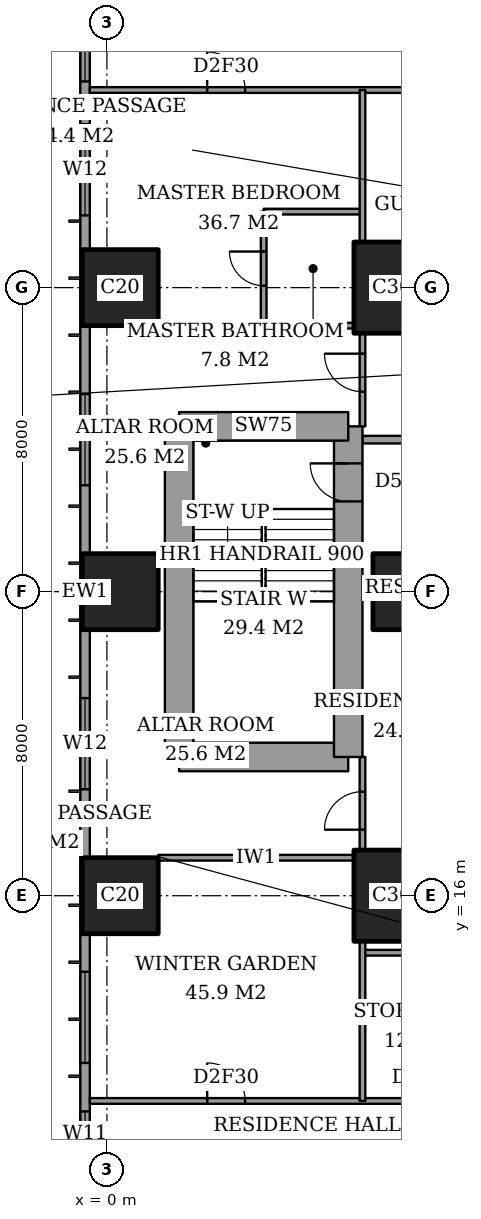
"""IFC4 building model, lengths in metres.
Left out: names, types, materials, properties, quantities, classifications, styles, units other than length and angle.
Written with IfcOpenShell. Run it as: python <this file> out.ifc"""

import sys

from ifc_helpers import new_model, si_unit, direction, frame, frame_2d, origin, origin_2d, place, context, subcontext, project, spatial, rectangle, extrude, element, fill, save


model = new_model("IFC4")
c1 = context("Model", 3, precision=1e-05, world=origin(), true_north=direction((0.0, 1.0)))
c2 = subcontext(c1, "Body", "Model", "MODEL_VIEW")
j1 = project(units=[si_unit("LENGTHUNIT", "METRE"), si_unit("PLANEANGLEUNIT", "RADIAN")], contexts=[c1])
p1 = place(None, origin())
s1 = spatial("IfcSite", under=j1, at=p1, CompositionType="ELEMENT")
p2 = place(p1, origin())
s2 = spatial("IfcBuilding", under=s1, at=p2, CompositionType="ELEMENT")
p3 = place(p2, frame((0.0, 0.0, 125.0)))
s3 = spatial("IfcBuildingStorey", under=s2, at=p3, CompositionType="ELEMENT", Elevation=125.0)
for number, where, z_axis, x_axis in (
    (1, (0.35, 16.0, 0.0), (0.0, 0.0, 1.0), (1.0, 0.0, 0.0)),
    (2, (0.35, 24.0, 0.0), (0.0, 0.0, 1.0), (1.0, 0.0, 0.0)),
    (3, (0.35, 32.0, 0.0), (0.0, 0.0, 1.0), (1.0, 0.0, 0.0)),
):
    element("IfcColumn", number, at=place(p3, frame(where, z_axis=z_axis, x_axis=x_axis)), inside=s3, PredefinedType="COLUMN", context=c2, shape_type="SweptSolid", body=[
        extrude(rectangle(XDim=2.0, YDim=2.0, at=origin_2d()), origin(), (0.0, 0.0, 1.0), 3.6),
    ])
p4 = place(p3, frame((8.0, 16.0, 0.0), z_axis=(0.0, 0.0, 1.0), x_axis=(1.0, 0.0, 0.0)))
e4 = element("IfcColumn", 4, at=p4, inside=s3, PredefinedType="COLUMN", context=c2, shape_type="SweptSolid", body=[
    extrude(rectangle(XDim=3.0, YDim=2.4, at=origin_2d()), origin(), (0.0, 0.0, 1.0), 3.6),
])
p5 = place(p3, frame((8.0, 24.0, 0.0), z_axis=(0.0, 0.0, 1.0), x_axis=(1.0, 0.0, 0.0)))
e5 = element("IfcColumn", 5, at=p5, inside=s3, PredefinedType="COLUMN", context=c2, shape_type="SweptSolid", body=[
    extrude(rectangle(XDim=2.0, YDim=2.0, at=origin_2d()), origin(), (0.0, 0.0, 1.0), 3.6),
])
p6 = place(p3, frame((8.0, 32.0, 0.0), z_axis=(0.0, 0.0, 1.0), x_axis=(1.0, 0.0, 0.0)))
e6 = element("IfcColumn", 6, at=p6, inside=s3, PredefinedType="COLUMN", context=c2, shape_type="SweptSolid", body=[
    extrude(rectangle(XDim=3.0, YDim=2.4, at=origin_2d()), origin(), (0.0, 0.0, 1.0), 3.6),
])
p7 = place(p3, frame((1.9, 19.65, 0.0), z_axis=(0.0, 0.0, 1.0), x_axis=(1.0, 0.0, 0.0)))
e7 = element("IfcWall", 7, at=p7, inside=s3, PredefinedType="SHEAR", context=c2, shape_type="SweptSolid", body=[
    extrude(rectangle(XDim=4.45, YDim=0.75, at=frame_2d((2.225, 0.0))), origin(), (0.0, 0.0, 1.0), 3.6),
])
p8 = place(p3, frame((6.35, 19.65, 0.0), z_axis=(0.0, 0.0, 1.0), x_axis=(0.0, 1.0, 0.0)))
e8 = element("IfcWall", 8, at=p8, inside=s3, PredefinedType="SHEAR", context=c2, shape_type="SweptSolid", body=[
    extrude(rectangle(XDim=8.7, YDim=0.75, at=frame_2d((4.35, 0.0))), origin(), (0.0, 0.0, 1.0), 3.6),
])
p9 = place(p8, frame((6.725, 0.0, 0.0)))
e9 = element("IfcOpeningElement", 9, at=p9, cuts=e8, PredefinedType="OPENING", context=c2, shape_type="SweptSolid", body=[
    extrude(rectangle(XDim=1.0, YDim=2.1, at=frame_2d((0.5, 1.05))), frame((0.0, 0.385, 0.0), z_axis=(0.0, -1.0, 0.0), x_axis=(1.0, 0.0, 0.0)), (0.0, 0.0, 1.0), 0.77),
])
p10 = place(p3, frame((6.35, 28.35, 0.0), z_axis=(0.0, 0.0, 1.0), x_axis=(-1.0, 0.0, 0.0)))
e10 = element("IfcWall", 10, at=p10, inside=s3, PredefinedType="SHEAR", context=c2, shape_type="SweptSolid", body=[
    extrude(rectangle(XDim=4.45, YDim=0.75, at=frame_2d((2.225, 0.0))), origin(), (0.0, 0.0, 1.0), 3.6),
])
p11 = place(p3, frame((1.9, 28.35, 0.0), z_axis=(0.0, 0.0, 1.0), x_axis=(0.0, -1.0, 0.0)))
e11 = element("IfcWall", 11, at=p11, inside=s3, PredefinedType="SHEAR", context=c2, shape_type="SweptSolid", body=[
    extrude(rectangle(XDim=8.7, YDim=0.75, at=frame_2d((4.35, 0.0))), origin(), (0.0, 0.0, 1.0), 3.6),
])
p12 = place(p3, frame((-0.575, 44.825, 0.0), z_axis=(0.0, 0.0, 1.0), x_axis=(0.0, -1.0, 0.0)))
e12 = element("IfcWall", 12, at=p12, inside=s3, PredefinedType="SOLIDWALL", context=c2, shape_type="SweptSolid", body=[
    extrude(rectangle(XDim=41.65, YDim=0.25, at=frame_2d((20.825, 0.0))), origin(), (0.0, 0.0, 1.0), 3.6),
])
p13 = place(p12, frame((0.775, 0.0, 0.4)))
e13 = element("IfcOpeningElement", 13, at=p13, cuts=e12, PredefinedType="OPENING", context=c2, shape_type="SweptSolid", body=[
    extrude(rectangle(XDim=2.4, YDim=2.2, at=frame_2d((1.2, 1.1))), frame((0.0, 0.135, 0.0), z_axis=(0.0, -1.0, 0.0), x_axis=(1.0, 0.0, 0.0)), (0.0, 0.0, 1.0), 0.27),
])
p14 = place(p12, frame((6.2, 0.0, 0.4)))
e14 = element("IfcOpeningElement", 14, at=p14, cuts=e12, PredefinedType="OPENING", context=c2, shape_type="SweptSolid", body=[
    extrude(rectangle(XDim=1.2, YDim=2.2, at=frame_2d((0.6, 1.1))), frame((0.0, 0.135, 0.0), z_axis=(0.0, -1.0, 0.0), x_axis=(1.0, 0.0, 0.0)), (0.0, 0.0, 1.0), 0.27),
])
p15 = place(p12, frame((8.525, 0.0, 0.4)))
e15 = element("IfcOpeningElement", 15, at=p15, cuts=e12, PredefinedType="OPENING", context=c2, shape_type="SweptSolid", body=[
    extrude(rectangle(XDim=2.4, YDim=2.2, at=frame_2d((1.2, 1.1))), frame((0.0, 0.135, 0.0), z_axis=(0.0, -1.0, 0.0), x_axis=(1.0, 0.0, 0.0)), (0.0, 0.0, 1.0), 0.27),
])
p16 = place(p12, frame((15.625, 0.0, 0.4)))
e16 = element("IfcOpeningElement", 16, at=p16, cuts=e12, PredefinedType="OPENING", context=c2, shape_type="SweptSolid", body=[
    extrude(rectangle(XDim=2.4, YDim=2.2, at=frame_2d((1.2, 1.1))), frame((0.0, 0.135, 0.0), z_axis=(0.0, -1.0, 0.0), x_axis=(1.0, 0.0, 0.0)), (0.0, 0.0, 1.0), 0.27),
])
p17 = place(p12, frame((23.625, 0.0, 0.4)))
e17 = element("IfcOpeningElement", 17, at=p17, cuts=e12, PredefinedType="OPENING", context=c2, shape_type="SweptSolid", body=[
    extrude(rectangle(XDim=2.4, YDim=2.2, at=frame_2d((1.2, 1.1))), frame((0.0, 0.135, 0.0), z_axis=(0.0, -1.0, 0.0), x_axis=(1.0, 0.0, 0.0)), (0.0, 0.0, 1.0), 0.27),
])
p18 = place(p12, frame((30.825, 0.0, 0.4)))
e18 = element("IfcOpeningElement", 18, at=p18, cuts=e12, PredefinedType="OPENING", context=c2, shape_type="SweptSolid", body=[
    extrude(rectangle(XDim=2.4, YDim=2.2, at=frame_2d((1.2, 1.1))), frame((0.0, 0.135, 0.0), z_axis=(0.0, -1.0, 0.0), x_axis=(1.0, 0.0, 0.0)), (0.0, 0.0, 1.0), 0.27),
])
p19 = place(p12, frame((34.5, 0.0, 0.4)))
e19 = element("IfcOpeningElement", 19, at=p19, cuts=e12, PredefinedType="OPENING", context=c2, shape_type="SweptSolid", body=[
    extrude(rectangle(XDim=1.2, YDim=2.2, at=frame_2d((0.6, 1.1))), frame((0.0, 0.135, 0.0), z_axis=(0.0, -1.0, 0.0), x_axis=(1.0, 0.0, 0.0)), (0.0, 0.0, 1.0), 0.27),
])
p20 = place(p12, frame((38.475, 0.0, 0.4)))
e20 = element("IfcOpeningElement", 20, at=p20, cuts=e12, PredefinedType="OPENING", context=c2, shape_type="SweptSolid", body=[
    extrude(rectangle(XDim=2.4, YDim=2.2, at=frame_2d((1.2, 1.1))), frame((0.0, 0.135, 0.0), z_axis=(0.0, -1.0, 0.0), x_axis=(1.0, 0.0, 0.0)), (0.0, 0.0, 1.0), 0.27),
])
p21 = place(p3, frame((-0.45, 10.6, 0.0), z_axis=(0.0, 0.0, 1.0), x_axis=(1.0, 0.0, 0.0)))
e21 = element("IfcWall", 21, at=p21, inside=s3, PredefinedType="PARTITIONING", context=c2, shape_type="SweptSolid", body=[
    extrude(rectangle(XDim=25.011, YDim=0.15, at=frame_2d((12.505, 0.0))), origin(), (0.0, 0.0, 1.0), 3.35),
])
p22 = place(p21, frame((13.25, 0.0, 0.0)))
e22 = element("IfcOpeningElement", 22, at=p22, cuts=e21, PredefinedType="OPENING", context=c2, shape_type="SweptSolid", body=[
    extrude(rectangle(XDim=1.0, YDim=2.1, at=frame_2d((0.5, 1.05))), frame((0.0, 0.085, 0.0), z_axis=(0.0, -1.0, 0.0), x_axis=(1.0, 0.0, 0.0)), (0.0, 0.0, 1.0), 0.17),
])
p23 = place(p21, frame((3.087, 0.0, 0.0)))
e23 = element("IfcOpeningElement", 23, at=p23, cuts=e21, PredefinedType="OPENING", context=c2, shape_type="SweptSolid", body=[
    extrude(rectangle(XDim=1.0, YDim=2.1, at=frame_2d((0.5, 1.05))), frame((0.0, 0.085, 0.0), z_axis=(0.0, -1.0, 0.0), x_axis=(1.0, 0.0, 0.0)), (0.0, 0.0, 1.0), 0.17),
])
p24 = place(p21, frame((8.363, 0.0, 0.0)))
e24 = element("IfcOpeningElement", 24, at=p24, cuts=e21, PredefinedType="OPENING", context=c2, shape_type="SweptSolid", body=[
    extrude(rectangle(XDim=0.9, YDim=2.1, at=frame_2d((0.45, 1.05))), frame((0.0, 0.085, 0.0), z_axis=(0.0, -1.0, 0.0), x_axis=(1.0, 0.0, 0.0)), (0.0, 0.0, 1.0), 0.17),
])
p25 = place(p21, frame((11.05, 0.0, 0.0)))
e25 = element("IfcOpeningElement", 25, at=p25, cuts=e21, PredefinedType="OPENING", context=c2, shape_type="SweptSolid", body=[
    extrude(rectangle(XDim=1.0, YDim=2.1, at=frame_2d((0.5, 1.05))), frame((0.0, 0.085, 0.0), z_axis=(0.0, -1.0, 0.0), x_axis=(1.0, 0.0, 0.0)), (0.0, 0.0, 1.0), 0.17),
])
p26 = place(p21, frame((16.15, 0.0, 0.0)))
e26 = element("IfcOpeningElement", 26, at=p26, cuts=e21, PredefinedType="OPENING", context=c2, shape_type="SweptSolid", body=[
    extrude(rectangle(XDim=1.0, YDim=2.1, at=frame_2d((0.5, 1.05))), frame((0.0, 0.085, 0.0), z_axis=(0.0, -1.0, 0.0), x_axis=(1.0, 0.0, 0.0)), (0.0, 0.0, 1.0), 0.17),
])
p27 = place(p21, frame((21.175, 0.0, 0.0)))
e27 = element("IfcOpeningElement", 27, at=p27, cuts=e21, PredefinedType="OPENING", context=c2, shape_type="SweptSolid", body=[
    extrude(rectangle(XDim=1.0, YDim=2.1, at=frame_2d((0.5, 1.05))), frame((0.0, 0.085, 0.0), z_axis=(0.0, -1.0, 0.0), x_axis=(1.0, 0.0, 0.0)), (0.0, 0.0, 1.0), 0.17),
])
p28 = place(p3, frame((6.725, 14.5, 0.0), z_axis=(0.0, 0.0, 1.0), x_axis=(1.0, 0.0, 0.0)))
e28 = element("IfcWall", 28, at=p28, inside=s3, PredefinedType="PARTITIONING", context=c2, shape_type="SweptSolid", body=[
    extrude(rectangle(XDim=3.275, YDim=0.15, at=frame_2d((1.637, 0.0))), origin(), (0.0, 0.0, 1.0), 3.35),
])
p29 = place(p3, frame((1.35, 17.0, 0.0), z_axis=(0.0, 0.0, 1.0), x_axis=(1.0, 0.0, 0.0)))
e29 = element("IfcWall", 29, at=p29, inside=s3, PredefinedType="PARTITIONING", context=c2, shape_type="SweptSolid", body=[
    extrude(rectangle(XDim=5.15, YDim=0.15, at=frame_2d((2.575, 0.0))), origin(), (0.0, 0.0, 1.0), 3.35),
])
p30 = place(p3, frame((6.725, 28.0, 0.0), z_axis=(0.0, 0.0, 1.0), x_axis=(1.0, 0.0, 0.0)))
e30 = element("IfcWall", 30, at=p30, inside=s3, PredefinedType="PARTITIONING", context=c2, shape_type="SweptSolid", body=[
    extrude(rectangle(XDim=17.275, YDim=0.2, at=frame_2d((8.637, 0.0))), origin(), (0.0, 0.0, 1.0), 3.35),
])
p31 = place(p30, frame((7.175, 0.0, 0.0)))
e31 = element("IfcOpeningElement", 31, at=p31, cuts=e30, PredefinedType="OPENING", context=c2, shape_type="SweptSolid", body=[
    extrude(rectangle(XDim=1.2, YDim=2.4, at=frame_2d((0.6, 1.2))), frame((0.0, 0.11, 0.0), z_axis=(0.0, -1.0, 0.0), x_axis=(1.0, 0.0, 0.0)), (0.0, 0.0, 1.0), 0.22),
])
p32 = place(p3, frame((1.35, 31.0, 0.0), z_axis=(0.0, 0.0, 1.0), x_axis=(1.0, 0.0, 0.0)))
e32 = element("IfcWall", 32, at=p32, inside=s3, PredefinedType="PARTITIONING", context=c2, shape_type="SweptSolid", body=[
    extrude(rectangle(XDim=5.15, YDim=0.15, at=frame_2d((2.575, 0.0))), origin(), (0.0, 0.0, 1.0), 3.35),
])
p33 = place(p3, frame((4.125, 34.0, 0.0), z_axis=(0.0, 0.0, 1.0), x_axis=(1.0, 0.0, 0.0)))
e33 = element("IfcWall", 33, at=p33, inside=s3, PredefinedType="PARTITIONING", context=c2, shape_type="SweptSolid", body=[
    extrude(rectangle(XDim=2.6, YDim=0.15, at=frame_2d((1.3, 0.0))), origin(), (0.0, 0.0, 1.0), 3.35),
])
p34 = place(p3, frame((-0.45, 37.2, 0.0), z_axis=(0.0, 0.0, 1.0), x_axis=(1.0, 0.0, 0.0)))
e34 = element("IfcWall", 34, at=p34, inside=s3, PredefinedType="PARTITIONING", context=c2, shape_type="SweptSolid", body=[
    extrude(rectangle(XDim=25.011, YDim=0.15, at=frame_2d((12.505, 0.0))), origin(), (0.0, 0.0, 1.0), 3.35),
])
p35 = place(p34, frame((12.05, 0.0, 0.0)))
e35 = element("IfcOpeningElement", 35, at=p35, cuts=e34, PredefinedType="OPENING", context=c2, shape_type="SweptSolid", body=[
    extrude(rectangle(XDim=1.0, YDim=2.1, at=frame_2d((0.5, 1.05))), frame((0.0, 0.085, 0.0), z_axis=(0.0, -1.0, 0.0), x_axis=(1.0, 0.0, 0.0)), (0.0, 0.0, 1.0), 0.17),
])
p36 = place(p34, frame((3.087, 0.0, 0.0)))
e36 = element("IfcOpeningElement", 36, at=p36, cuts=e34, PredefinedType="OPENING", context=c2, shape_type="SweptSolid", body=[
    extrude(rectangle(XDim=1.0, YDim=2.1, at=frame_2d((0.5, 1.05))), frame((0.0, 0.085, 0.0), z_axis=(0.0, -1.0, 0.0), x_axis=(1.0, 0.0, 0.0)), (0.0, 0.0, 1.0), 0.17),
])
p37 = place(p34, frame((8.863, 0.0, 0.0)))
e37 = element("IfcOpeningElement", 37, at=p37, cuts=e34, PredefinedType="OPENING", context=c2, shape_type="SweptSolid", body=[
    extrude(rectangle(XDim=0.9, YDim=2.1, at=frame_2d((0.45, 1.05))), frame((0.0, 0.085, 0.0), z_axis=(0.0, -1.0, 0.0), x_axis=(1.0, 0.0, 0.0)), (0.0, 0.0, 1.0), 0.17),
])
p38 = place(p34, frame((15.55, 0.0, 0.0)))
e38 = element("IfcOpeningElement", 38, at=p38, cuts=e34, PredefinedType="OPENING", context=c2, shape_type="SweptSolid", body=[
    extrude(rectangle(XDim=1.0, YDim=2.1, at=frame_2d((0.5, 1.05))), frame((0.0, 0.085, 0.0), z_axis=(0.0, -1.0, 0.0), x_axis=(1.0, 0.0, 0.0)), (0.0, 0.0, 1.0), 0.17),
])
p39 = place(p34, frame((21.175, 0.0, 0.0)))
e39 = element("IfcOpeningElement", 39, at=p39, cuts=e34, PredefinedType="OPENING", context=c2, shape_type="SweptSolid", body=[
    extrude(rectangle(XDim=1.0, YDim=2.1, at=frame_2d((0.5, 1.05))), frame((0.0, 0.085, 0.0), z_axis=(0.0, -1.0, 0.0), x_axis=(1.0, 0.0, 0.0)), (0.0, 0.0, 1.0), 0.17),
])
p40 = place(p3, frame((4.125, 31.0, 0.0), z_axis=(0.0, 0.0, 1.0), x_axis=(0.0, 1.0, 0.0)))
e40 = element("IfcWall", 40, at=p40, inside=s3, PredefinedType="PARTITIONING", context=c2, shape_type="SweptSolid", body=[
    extrude(rectangle(XDim=3.0, YDim=0.15, at=frame_2d((1.5, 0.0))), origin(), (0.0, 0.0, 1.0), 3.35),
])
p41 = place(p40, frame((1.05, 0.0, 0.0)))
e41 = element("IfcOpeningElement", 41, at=p41, cuts=e40, PredefinedType="OPENING", context=c2, shape_type="SweptSolid", body=[
    extrude(rectangle(XDim=0.9, YDim=2.1, at=frame_2d((0.45, 1.05))), frame((0.0, 0.085, 0.0), z_axis=(0.0, -1.0, 0.0), x_axis=(1.0, 0.0, 0.0)), (0.0, 0.0, 1.0), 0.17),
])
p42 = place(p3, frame((6.725, 10.6, 0.0), z_axis=(0.0, 0.0, 1.0), x_axis=(0.0, 1.0, 0.0)))
e42 = element("IfcWall", 42, at=p42, inside=s3, PredefinedType="PARTITIONING", context=c2, shape_type="SweptSolid", body=[
    extrude(rectangle(XDim=4.2, YDim=0.15, at=frame_2d((2.1, 0.0))), origin(), (0.0, 0.0, 1.0), 3.35),
])
p43 = place(p3, frame((6.725, 17.2, 0.0), z_axis=(0.0, 0.0, 1.0), x_axis=(0.0, 1.0, 0.0)))
e43 = element("IfcWall", 43, at=p43, inside=s3, PredefinedType="PARTITIONING", context=c2, shape_type="SweptSolid", body=[
    extrude(rectangle(XDim=2.45, YDim=0.15, at=frame_2d((1.225, 0.0))), origin(), (0.0, 0.0, 1.0), 3.35),
])
p44 = place(p43, frame((0.538, 0.0, 0.0)))
e44 = element("IfcOpeningElement", 44, at=p44, cuts=e43, PredefinedType="OPENING", context=c2, shape_type="SweptSolid", body=[
    extrude(rectangle(XDim=1.0, YDim=2.1, at=frame_2d((0.5, 1.05))), frame((0.0, 0.085, 0.0), z_axis=(0.0, -1.0, 0.0), x_axis=(1.0, 0.0, 0.0)), (0.0, 0.0, 1.0), 0.17),
])
p45 = place(p3, frame((6.725, 28.35, 0.0), z_axis=(0.0, 0.0, 1.0), x_axis=(0.0, 1.0, 0.0)))
e45 = element("IfcWall", 45, at=p45, inside=s3, PredefinedType="PARTITIONING", context=c2, shape_type="SweptSolid", body=[
    extrude(rectangle(XDim=2.45, YDim=0.15, at=frame_2d((1.225, 0.0))), origin(), (0.0, 0.0, 1.0), 3.35),
])
p46 = place(p45, frame((0.913, 0.0, 0.0)))
e46 = element("IfcOpeningElement", 46, at=p46, cuts=e45, PredefinedType="OPENING", context=c2, shape_type="SweptSolid", body=[
    extrude(rectangle(XDim=1.0, YDim=2.1, at=frame_2d((0.5, 1.05))), frame((0.0, 0.085, 0.0), z_axis=(0.0, -1.0, 0.0), x_axis=(1.0, 0.0, 0.0)), (0.0, 0.0, 1.0), 0.17),
])
p47 = place(p3, frame((6.725, 33.2, 0.0), z_axis=(0.0, 0.0, 1.0), x_axis=(0.0, 1.0, 0.0)))
e47 = element("IfcWall", 47, at=p47, inside=s3, PredefinedType="PARTITIONING", context=c2, shape_type="SweptSolid", body=[
    extrude(rectangle(XDim=4.0, YDim=0.15, at=frame_2d((2.0, 0.0))), origin(), (0.0, 0.0, 1.0), 3.35),
])
p48 = place(p14, origin())
e48 = element("IfcWindow", 48, at=p48, inside=s3, PartitioningType="SINGLE_PANEL", PredefinedType="WINDOW", context=c2, shape_type="SweptSolid", body=[
    extrude(rectangle(XDim=1.2, YDim=2.2, at=frame_2d((0.6, 1.1))), frame((0.0, 0.03, 0.0), z_axis=(0.0, -1.0, 0.0), x_axis=(1.0, 0.0, 0.0)), (0.0, 0.0, 1.0), 0.06),
])
fill(e14, e48)
p49 = place(p15, origin())
e49 = element("IfcWindow", 49, at=p49, inside=s3, PartitioningType="SINGLE_PANEL", PredefinedType="WINDOW", context=c2, shape_type="SweptSolid", body=[
    extrude(rectangle(XDim=2.4, YDim=2.2, at=frame_2d((1.2, 1.1))), frame((0.0, 0.03, 0.0), z_axis=(0.0, -1.0, 0.0), x_axis=(1.0, 0.0, 0.0)), (0.0, 0.0, 1.0), 0.06),
])
fill(e15, e49)
p50 = place(p16, origin())
e50 = element("IfcWindow", 50, at=p50, inside=s3, PartitioningType="SINGLE_PANEL", PredefinedType="WINDOW", context=c2, shape_type="SweptSolid", body=[
    extrude(rectangle(XDim=2.4, YDim=2.2, at=frame_2d((1.2, 1.1))), frame((0.0, 0.03, 0.0), z_axis=(0.0, -1.0, 0.0), x_axis=(1.0, 0.0, 0.0)), (0.0, 0.0, 1.0), 0.06),
])
fill(e16, e50)
p51 = place(p17, origin())
e51 = element("IfcWindow", 51, at=p51, inside=s3, PartitioningType="SINGLE_PANEL", PredefinedType="WINDOW", context=c2, shape_type="SweptSolid", body=[
    extrude(rectangle(XDim=2.4, YDim=2.2, at=frame_2d((1.2, 1.1))), frame((0.0, 0.03, 0.0), z_axis=(0.0, -1.0, 0.0), x_axis=(1.0, 0.0, 0.0)), (0.0, 0.0, 1.0), 0.06),
])
fill(e17, e51)
p52 = place(p18, origin())
e52 = element("IfcWindow", 52, at=p52, inside=s3, PartitioningType="SINGLE_PANEL", PredefinedType="WINDOW", context=c2, shape_type="SweptSolid", body=[
    extrude(rectangle(XDim=2.4, YDim=2.2, at=frame_2d((1.2, 1.1))), frame((0.0, 0.03, 0.0), z_axis=(0.0, -1.0, 0.0), x_axis=(1.0, 0.0, 0.0)), (0.0, 0.0, 1.0), 0.06),
])
fill(e18, e52)
p53 = place(p19, origin())
e53 = element("IfcWindow", 53, at=p53, inside=s3, PartitioningType="SINGLE_PANEL", PredefinedType="WINDOW", context=c2, shape_type="SweptSolid", body=[
    extrude(rectangle(XDim=1.2, YDim=2.2, at=frame_2d((0.6, 1.1))), frame((0.0, 0.03, 0.0), z_axis=(0.0, -1.0, 0.0), x_axis=(1.0, 0.0, 0.0)), (0.0, 0.0, 1.0), 0.06),
])
fill(e19, e53)
p54 = place(p23, origin())
e54 = element("IfcDoor", 54, at=p54, inside=s3, OperationType="SINGLE_SWING_RIGHT", PredefinedType="DOOR", context=c2, shape_type="SweptSolid", body=[
    extrude(rectangle(XDim=1.0, YDim=2.1, at=frame_2d((0.5, 1.05))), frame((0.0, 0.025, 0.0), z_axis=(0.0, -1.0, 0.0), x_axis=(1.0, 0.0, 0.0)), (0.0, 0.0, 1.0), 0.05),
])
fill(e23, e54)
p55 = place(p44, origin())
e55 = element("IfcDoor", 55, at=p55, inside=s3, OperationType="SINGLE_SWING_RIGHT", PredefinedType="DOOR", context=c2, shape_type="SweptSolid", body=[
    extrude(rectangle(XDim=1.0, YDim=2.1, at=frame_2d((0.5, 1.05))), frame((0.0, 0.025, 0.0), z_axis=(0.0, -1.0, 0.0), x_axis=(1.0, 0.0, 0.0)), (0.0, 0.0, 1.0), 0.05),
])
fill(e44, e55)
p56 = place(p41, origin())
e56 = element("IfcDoor", 56, at=p56, inside=s3, OperationType="SINGLE_SWING_LEFT", PredefinedType="DOOR", context=c2, shape_type="SweptSolid", body=[
    extrude(rectangle(XDim=0.9, YDim=2.1, at=frame_2d((0.45, 1.05))), frame((0.0, 0.025, 0.0), z_axis=(0.0, -1.0, 0.0), x_axis=(1.0, 0.0, 0.0)), (0.0, 0.0, 1.0), 0.05),
])
fill(e41, e56)
p57 = place(p36, origin())
e57 = element("IfcDoor", 57, at=p57, inside=s3, OperationType="SINGLE_SWING_RIGHT", PredefinedType="DOOR", context=c2, shape_type="SweptSolid", body=[
    extrude(rectangle(XDim=1.0, YDim=2.1, at=frame_2d((0.5, 1.05))), frame((0.0, 0.025, 0.0), z_axis=(0.0, -1.0, 0.0), x_axis=(1.0, 0.0, 0.0)), (0.0, 0.0, 1.0), 0.05),
])
fill(e36, e57)
p58 = place(p46, origin())
e58 = element("IfcDoor", 58, at=p58, inside=s3, OperationType="SINGLE_SWING_LEFT", PredefinedType="DOOR", context=c2, shape_type="SweptSolid", body=[
    extrude(rectangle(XDim=1.0, YDim=2.1, at=frame_2d((0.5, 1.05))), frame((0.0, 0.025, 0.0), z_axis=(0.0, -1.0, 0.0), x_axis=(1.0, 0.0, 0.0)), (0.0, 0.0, 1.0), 0.05),
])
fill(e46, e58)
p59 = place(p9, origin())
e59 = element("IfcDoor", 59, at=p59, inside=s3, OperationType="SINGLE_SWING_LEFT", PredefinedType="DOOR", context=c2, shape_type="SweptSolid", body=[
    extrude(rectangle(XDim=1.0, YDim=2.1, at=frame_2d((0.5, 1.05))), frame((0.0, 0.025, 0.0), z_axis=(0.0, -1.0, 0.0), x_axis=(1.0, 0.0, 0.0)), (0.0, 0.0, 1.0), 0.05),
])
fill(e9, e59)
save(model, sys.argv[1])
